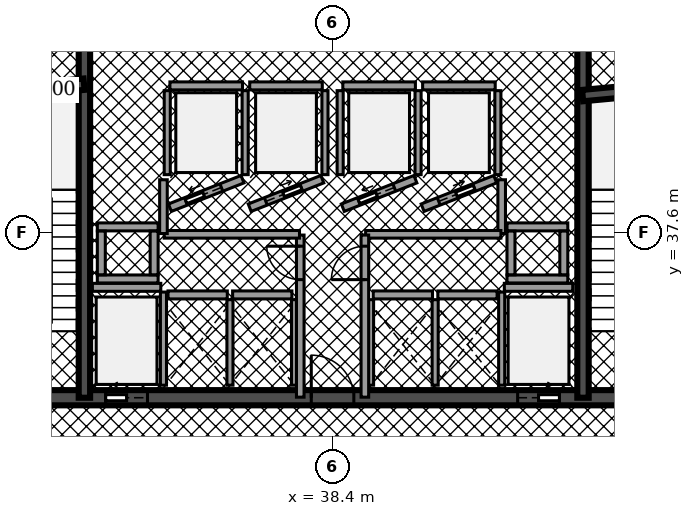
"""IFC4 building model, lengths in metres.
Left out: names, types, materials, properties, quantities, classifications, styles, units other than length and angle.
Written with IfcOpenShell. Run it as: python <this file> out.ifc"""

import sys

from ifc_helpers import new_model, si_unit, direction, frame, frame_2d, origin, place, context, subcontext, project, spatial, rectangle, extrude, element, fill, save


model = new_model("IFC4")
c1 = context("Model", 3, precision=1e-05, world=origin(), true_north=direction((0.0, 1.0)))
c2 = subcontext(c1, "Body", "Model", "MODEL_VIEW")
j1 = project(units=[si_unit("LENGTHUNIT", "METRE"), si_unit("PLANEANGLEUNIT", "RADIAN")], contexts=[c1])
p1 = place(None, origin())
s1 = spatial("IfcSite", under=j1, at=p1, CompositionType="ELEMENT")
p2 = place(p1, origin())
s2 = spatial("IfcBuilding", under=s1, at=p2, CompositionType="ELEMENT")
p3 = place(p2, frame((0.0, 0.0, 22.78)))
s3 = spatial("IfcBuildingStorey", under=s2, at=p3, CompositionType="ELEMENT", Elevation=22.78)
p4 = place(p3, frame((28.4, 33.25, 0.0), z_axis=(0.0, 0.0, 1.0), x_axis=(1.0, 0.0, 0.0)))
e1 = element("IfcWall", 1, at=p4, inside=s3, PredefinedType="SHEAR", context=c2, shape_type="SweptSolid", body=[
    extrude(rectangle(XDim=20.06, YDim=0.4, at=frame_2d((10.03, 0.0))), origin(), (0.0, 0.0, 1.0), 4.5),
])
p5 = place(p4, frame((4.03, 0.0, 0.0)))
e2 = element("IfcOpeningElement", 2, at=p5, cuts=e1, PredefinedType="OPENING", context=c2, shape_type="SweptSolid", body=[
    extrude(rectangle(XDim=1.1, YDim=2.15, at=frame_2d((0.55, 1.075))), frame((0.0, 0.21, 0.0), z_axis=(0.0, -1.0, 0.0), x_axis=(1.0, 0.0, 0.0)), (0.0, 0.0, 1.0), 0.42),
])
p6 = place(p4, frame((14.87, 0.0, 0.0)))
e3 = element("IfcOpeningElement", 3, at=p6, cuts=e1, PredefinedType="OPENING", context=c2, shape_type="SweptSolid", body=[
    extrude(rectangle(XDim=1.1, YDim=2.15, at=frame_2d((0.55, 1.075))), frame((0.0, 0.21, 0.0), z_axis=(0.0, -1.0, 0.0), x_axis=(1.0, 0.0, 0.0)), (0.0, 0.0, 1.0), 0.42),
])
p7 = place(p4, frame((1.31, 0.0, 0.0)))
e4 = element("IfcOpeningElement", 4, at=p7, cuts=e1, PredefinedType="OPENING", context=c2, shape_type="SweptSolid", body=[
    extrude(rectangle(XDim=1.1, YDim=2.2, at=frame_2d((0.55, 1.1))), frame((0.0, 0.21, 0.0), z_axis=(0.0, -1.0, 0.0), x_axis=(1.0, 0.0, 0.0)), (0.0, 0.0, 1.0), 0.42),
])
p8 = place(p4, frame((9.44, 0.0, 0.0)))
e5 = element("IfcOpeningElement", 5, at=p8, cuts=e1, PredefinedType="OPENING", context=c2, shape_type="SweptSolid", body=[
    extrude(rectangle(XDim=1.12, YDim=2.05, at=frame_2d((0.56, 1.025))), frame((0.0, 0.21, 0.0), z_axis=(0.0, -1.0, 0.0), x_axis=(1.0, 0.0, 0.0)), (0.0, 0.0, 1.0), 0.42),
])
p9 = place(p4, frame((17.65, 0.0, 0.0)))
e6 = element("IfcOpeningElement", 6, at=p9, cuts=e1, PredefinedType="OPENING", context=c2, shape_type="SweptSolid", body=[
    extrude(rectangle(XDim=1.1, YDim=2.2, at=frame_2d((0.55, 1.1))), frame((0.0, 0.21, 0.0), z_axis=(0.0, -1.0, 0.0), x_axis=(1.0, 0.0, 0.0)), (0.0, 0.0, 1.0), 0.42),
])
for number, where, z_axis, x_axis in (
    (7, (31.87, 33.25, 0.0), (0.0, 0.0, 1.0), (0.0, 1.0, 0.0)),
    (8, (44.99, 33.25, 0.0), (0.0, 0.0, 1.0), (0.0, 1.0, 0.0)),
):
    element("IfcWall", number, at=place(p3, frame(where, z_axis=z_axis, x_axis=x_axis)), inside=s3, PredefinedType="SHEAR", context=c2, shape_type="SweptSolid", body=[
        extrude(rectangle(XDim=10.2, YDim=0.3, at=frame_2d((5.1, 0.0))), origin(), (0.0, 0.0, 1.0), 4.5),
    ])
p10 = place(p3, frame((28.64, 41.2, 0.0), z_axis=(0.0, 0.0, 1.0), x_axis=(0.995687118776, 0.092774789157, 0.0)))
e9 = element("IfcWall", 9, at=p10, inside=s3, PredefinedType="SHEAR", context=c2, shape_type="SweptSolid", body=[
    extrude(rectangle(XDim=3.234, YDim=0.3, at=frame_2d((1.617, 0.0))), origin(), (0.0, 0.0, 1.0), 4.5),
])
p11 = place(p3, frame((44.98, 41.2, 0.0), z_axis=(0.0, 0.0, 1.0), x_axis=(0.995686468965, 0.09278176286, 0.0)))
e10 = element("IfcWall", 10, at=p11, inside=s3, PredefinedType="SHEAR", context=c2, shape_type="SweptSolid", body=[
    extrude(rectangle(XDim=3.234, YDim=0.3, at=frame_2d((1.617, 0.0))), origin(), (0.0, 0.0, 1.0), 4.5),
])
p12 = place(p3, frame((32.08, 36.155, 0.0), z_axis=(0.0, 0.0, 1.0), x_axis=(1.0, 0.0, 0.0)))
e11 = element("IfcWall", 11, at=p12, inside=s3, PredefinedType="SOLIDWALL", context=c2, shape_type="SweptSolid", body=[
    extrude(rectangle(XDim=1.8, YDim=0.21, at=frame_2d((0.9, 0.0))), origin(), (0.0, 0.0, 1.0), 3.472),
])
p13 = place(p3, frame((33.95, 33.58, 0.0), z_axis=(0.0, 0.0, 1.0), x_axis=(0.0, 1.0, 0.0)))
e12 = element("IfcWall", 12, at=p13, inside=s3, PredefinedType="SOLIDWALL", context=c2, shape_type="SweptSolid", body=[
    extrude(rectangle(XDim=2.45, YDim=0.16, at=frame_2d((1.225, 0.0))), origin(), (0.0, 0.0, 1.0), 3.472),
])
p14 = place(p3, frame((42.92, 36.155, 0.0), z_axis=(0.0, 0.0, 1.0), x_axis=(1.0, 0.0, 0.0)))
e13 = element("IfcWall", 13, at=p14, inside=s3, PredefinedType="SOLIDWALL", context=c2, shape_type="SweptSolid", body=[
    extrude(rectangle(XDim=1.8, YDim=0.21, at=frame_2d((0.9, 0.0))), origin(), (0.0, 0.0, 1.0), 3.472),
])
p15 = place(p3, frame((42.85, 33.58, 0.0), z_axis=(0.0, 0.0, 1.0), x_axis=(0.0, 1.0, 0.0)))
e14 = element("IfcWall", 14, at=p15, inside=s3, PredefinedType="SOLIDWALL", context=c2, shape_type="SweptSolid", body=[
    extrude(rectangle(XDim=2.45, YDim=0.16, at=frame_2d((1.225, 0.0))), origin(), (0.0, 0.0, 1.0), 3.472),
])
p16 = place(p3, frame((34.12, 38.25, 0.0), z_axis=(0.0, 0.0, 1.0), x_axis=(0.930804993012, 0.36551616241, 0.0)))
e15 = element("IfcWall", 15, at=p16, inside=s3, PredefinedType="SOLIDWALL", context=c2, shape_type="SweptSolid", body=[
    extrude(rectangle(XDim=2.052, YDim=0.21, at=frame_2d((1.026, 0.0))), origin(), (0.0, 0.0, 1.0), 3.472),
])
p17 = place(p16, frame((0.455, 0.0, 0.0)))
e16 = element("IfcOpeningElement", 16, at=p17, cuts=e15, PredefinedType="OPENING", context=c2, shape_type="SweptSolid", body=[
    extrude(rectangle(XDim=1.0, YDim=2.1, at=frame_2d((0.5, 1.05))), frame((0.0, 0.115, 0.0), z_axis=(0.0, -1.0, 0.0), x_axis=(1.0, 0.0, 0.0)), (0.0, 0.0, 1.0), 0.23),
])
p18 = place(p3, frame((34.12, 41.455, 0.0), z_axis=(0.0, 0.0, 1.0), x_axis=(1.0, 0.0, 0.0)))
e17 = element("IfcWall", 17, at=p18, inside=s3, PredefinedType="SOLIDWALL", context=c2, shape_type="SweptSolid", body=[
    extrude(rectangle(XDim=1.91, YDim=0.21, at=frame_2d((0.955, 0.0))), origin(), (0.0, 0.0, 1.0), 3.472),
])
for number, where, z_axis, x_axis in (
    (18, (34.05, 39.12, 0.0), (0.0, 0.0, 1.0), (0.0, 1.0, 0.0)),
    (19, (36.1, 39.12, 0.0), (0.0, 0.0, 1.0), (0.0, 1.0, 0.0)),
):
    element("IfcWall", number, at=place(p3, frame(where, z_axis=z_axis, x_axis=x_axis)), inside=s3, PredefinedType="SOLIDWALL", context=c2, shape_type="SweptSolid", body=[
        extrude(rectangle(XDim=2.21, YDim=0.16, at=frame_2d((1.105, 0.0))), origin(), (0.0, 0.0, 1.0), 3.472),
    ])
p19 = place(p3, frame((36.22, 38.25, 0.0), z_axis=(0.0, 0.0, 1.0), x_axis=(0.930804993012, 0.36551616241, 0.0)))
e20 = element("IfcWall", 20, at=p19, inside=s3, PredefinedType="SOLIDWALL", context=c2, shape_type="SweptSolid", body=[
    extrude(rectangle(XDim=2.052, YDim=0.21, at=frame_2d((1.026, 0.0))), origin(), (0.0, 0.0, 1.0), 3.472),
])
p20 = place(p19, frame((0.455, 0.0, 0.0)))
e21 = element("IfcOpeningElement", 21, at=p20, cuts=e20, PredefinedType="OPENING", context=c2, shape_type="SweptSolid", body=[
    extrude(rectangle(XDim=1.0, YDim=2.1, at=frame_2d((0.5, 1.05))), frame((0.0, 0.115, 0.0), z_axis=(0.0, -1.0, 0.0), x_axis=(1.0, 0.0, 0.0)), (0.0, 0.0, 1.0), 0.23),
])
p21 = place(p3, frame((36.22, 41.455, 0.0), z_axis=(0.0, 0.0, 1.0), x_axis=(1.0, 0.0, 0.0)))
e22 = element("IfcWall", 22, at=p21, inside=s3, PredefinedType="SOLIDWALL", context=c2, shape_type="SweptSolid", body=[
    extrude(rectangle(XDim=1.91, YDim=0.21, at=frame_2d((0.955, 0.0))), origin(), (0.0, 0.0, 1.0), 3.472),
])
p22 = place(p3, frame((38.2, 39.12, 0.0), z_axis=(0.0, 0.0, 1.0), x_axis=(0.0, 1.0, 0.0)))
e23 = element("IfcWall", 23, at=p22, inside=s3, PredefinedType="SOLIDWALL", context=c2, shape_type="SweptSolid", body=[
    extrude(rectangle(XDim=2.21, YDim=0.16, at=frame_2d((1.105, 0.0))), origin(), (0.0, 0.0, 1.0), 3.472),
])
p23 = place(p3, frame((38.67, 38.25, 0.0), z_axis=(0.0, 0.0, 1.0), x_axis=(0.930820886763, 0.3654756856, 0.0)))
e24 = element("IfcWall", 24, at=p23, inside=s3, PredefinedType="SOLIDWALL", context=c2, shape_type="SweptSolid", body=[
    extrude(rectangle(XDim=2.052, YDim=0.21, at=frame_2d((1.026, 0.0))), origin(), (0.0, 0.0, 1.0), 3.472),
])
p24 = place(p23, frame((0.455, 0.0, 0.0)))
e25 = element("IfcOpeningElement", 25, at=p24, cuts=e24, PredefinedType="OPENING", context=c2, shape_type="SweptSolid", body=[
    extrude(rectangle(XDim=1.0, YDim=2.1, at=frame_2d((0.5, 1.05))), frame((0.0, 0.115, 0.0), z_axis=(0.0, -1.0, 0.0), x_axis=(1.0, 0.0, 0.0)), (0.0, 0.0, 1.0), 0.23),
])
p25 = place(p3, frame((38.67, 41.455, 0.0), z_axis=(0.0, 0.0, 1.0), x_axis=(1.0, 0.0, 0.0)))
e26 = element("IfcWall", 26, at=p25, inside=s3, PredefinedType="SOLIDWALL", context=c2, shape_type="SweptSolid", body=[
    extrude(rectangle(XDim=1.91, YDim=0.21, at=frame_2d((0.955, 0.0))), origin(), (0.0, 0.0, 1.0), 3.472),
])
for number, where, z_axis, x_axis in (
    (27, (38.6, 39.12, 0.0), (0.0, 0.0, 1.0), (0.0, 1.0, 0.0)),
    (28, (40.65, 39.12, 0.0), (0.0, 0.0, 1.0), (0.0, 1.0, 0.0)),
):
    element("IfcWall", number, at=place(p3, frame(where, z_axis=z_axis, x_axis=x_axis)), inside=s3, PredefinedType="SOLIDWALL", context=c2, shape_type="SweptSolid", body=[
        extrude(rectangle(XDim=2.21, YDim=0.16, at=frame_2d((1.105, 0.0))), origin(), (0.0, 0.0, 1.0), 3.472),
    ])
p26 = place(p3, frame((40.77, 38.25, 0.0), z_axis=(0.0, 0.0, 1.0), x_axis=(0.930804993012, 0.36551616241, 0.0)))
e29 = element("IfcWall", 29, at=p26, inside=s3, PredefinedType="SOLIDWALL", context=c2, shape_type="SweptSolid", body=[
    extrude(rectangle(XDim=2.052, YDim=0.21, at=frame_2d((1.026, 0.0))), origin(), (0.0, 0.0, 1.0), 3.472),
])
p27 = place(p26, frame((0.455, 0.0, 0.0)))
e30 = element("IfcOpeningElement", 30, at=p27, cuts=e29, PredefinedType="OPENING", context=c2, shape_type="SweptSolid", body=[
    extrude(rectangle(XDim=1.0, YDim=2.1, at=frame_2d((0.5, 1.05))), frame((0.0, 0.115, 0.0), z_axis=(0.0, -1.0, 0.0), x_axis=(1.0, 0.0, 0.0)), (0.0, 0.0, 1.0), 0.23),
])
p28 = place(p3, frame((40.77, 41.455, 0.0), z_axis=(0.0, 0.0, 1.0), x_axis=(1.0, 0.0, 0.0)))
e31 = element("IfcWall", 31, at=p28, inside=s3, PredefinedType="SOLIDWALL", context=c2, shape_type="SweptSolid", body=[
    extrude(rectangle(XDim=1.91, YDim=0.21, at=frame_2d((0.955, 0.0))), origin(), (0.0, 0.0, 1.0), 3.472),
])
p29 = place(p3, frame((42.75, 39.12, 0.0), z_axis=(0.0, 0.0, 1.0), x_axis=(0.0, 1.0, 0.0)))
e32 = element("IfcWall", 32, at=p29, inside=s3, PredefinedType="SOLIDWALL", context=c2, shape_type="SweptSolid", body=[
    extrude(rectangle(XDim=2.21, YDim=0.16, at=frame_2d((1.105, 0.0))), origin(), (0.0, 0.0, 1.0), 3.472),
])
p30 = place(p3, frame((34.07, 35.955, 0.0), z_axis=(0.0, 0.0, 1.0), x_axis=(1.0, 0.0, 0.0)))
e33 = element("IfcWall", 33, at=p30, inside=s3, PredefinedType="SOLIDWALL", context=c2, shape_type="SweptSolid", body=[
    extrude(rectangle(XDim=1.56, YDim=0.21, at=frame_2d((0.78, 0.0))), origin(), (0.0, 0.0, 1.0), 3.472),
])
p31 = place(p3, frame((35.7, 33.58, 0.0), z_axis=(0.0, 0.0, 1.0), x_axis=(0.0, 1.0, 0.0)))
e34 = element("IfcWall", 34, at=p31, inside=s3, PredefinedType="SOLIDWALL", context=c2, shape_type="SweptSolid", body=[
    extrude(rectangle(XDim=2.25, YDim=0.16, at=frame_2d((1.125, 0.0))), origin(), (0.0, 0.0, 1.0), 3.472),
])
p32 = place(p3, frame((35.77, 35.955, 0.0), z_axis=(0.0, 0.0, 1.0), x_axis=(1.0, 0.0, 0.0)))
e35 = element("IfcWall", 35, at=p32, inside=s3, PredefinedType="SOLIDWALL", context=c2, shape_type="SweptSolid", body=[
    extrude(rectangle(XDim=1.56, YDim=0.21, at=frame_2d((0.78, 0.0))), origin(), (0.0, 0.0, 1.0), 3.472),
])
p33 = place(p3, frame((37.4, 33.58, 0.0), z_axis=(0.0, 0.0, 1.0), x_axis=(0.0, 1.0, 0.0)))
e36 = element("IfcWall", 36, at=p33, inside=s3, PredefinedType="SOLIDWALL", context=c2, shape_type="SweptSolid", body=[
    extrude(rectangle(XDim=2.25, YDim=0.16, at=frame_2d((1.125, 0.0))), origin(), (0.0, 0.0, 1.0), 3.472),
])
p34 = place(p3, frame((39.47, 35.955, 0.0), z_axis=(0.0, 0.0, 1.0), x_axis=(1.0, 0.0, 0.0)))
e37 = element("IfcWall", 37, at=p34, inside=s3, PredefinedType="SOLIDWALL", context=c2, shape_type="SweptSolid", body=[
    extrude(rectangle(XDim=1.56, YDim=0.21, at=frame_2d((0.78, 0.0))), origin(), (0.0, 0.0, 1.0), 3.472),
])
for number, where, z_axis, x_axis in (
    (38, (39.4, 33.58, 0.0), (0.0, 0.0, 1.0), (0.0, 1.0, 0.0)),
    (39, (41.1, 33.58, 0.0), (0.0, 0.0, 1.0), (0.0, 1.0, 0.0)),
):
    element("IfcWall", number, at=place(p3, frame(where, z_axis=z_axis, x_axis=x_axis)), inside=s3, PredefinedType="SOLIDWALL", context=c2, shape_type="SweptSolid", body=[
        extrude(rectangle(XDim=2.25, YDim=0.16, at=frame_2d((1.125, 0.0))), origin(), (0.0, 0.0, 1.0), 3.472),
    ])
p35 = place(p3, frame((41.17, 35.955, 0.0), z_axis=(0.0, 0.0, 1.0), x_axis=(1.0, 0.0, 0.0)))
e40 = element("IfcWall", 40, at=p35, inside=s3, PredefinedType="SOLIDWALL", context=c2, shape_type="SweptSolid", body=[
    extrude(rectangle(XDim=1.56, YDim=0.21, at=frame_2d((0.78, 0.0))), origin(), (0.0, 0.0, 1.0), 3.472),
])
for number, where, z_axis, x_axis in (
    (41, (32.21, 36.375, 0.0), (0.0, 0.0, 1.0), (1.0, 0.0, 0.0)),
    (42, (32.21, 37.745, 0.0), (0.0, 0.0, 1.0), (1.0, 0.0, 0.0)),
):
    element("IfcWall", number, at=place(p3, frame(where, z_axis=z_axis, x_axis=x_axis)), inside=s3, PredefinedType="SOLIDWALL", context=c2, shape_type="SweptSolid", body=[
        extrude(rectangle(XDim=1.6, YDim=0.21, at=frame_2d((0.8, 0.0))), origin(), (0.0, 0.0, 1.0), 4.5),
    ])
for number, where, z_axis, x_axis in (
    (43, (32.315, 36.485, 0.0), (0.0, 0.0, 1.0), (0.0, 1.0, 0.0)),
    (44, (33.705, 36.485, 0.0), (0.0, 0.0, 1.0), (0.0, 1.0, 0.0)),
):
    element("IfcWall", number, at=place(p3, frame(where, z_axis=z_axis, x_axis=x_axis)), inside=s3, PredefinedType="SOLIDWALL", context=c2, shape_type="SweptSolid", body=[
        extrude(rectangle(XDim=1.15, YDim=0.21, at=frame_2d((0.575, 0.0))), origin(), (0.0, 0.0, 1.0), 4.5),
    ])
for number, where, z_axis, x_axis in (
    (45, (42.99, 36.375, 0.0), (0.0, 0.0, 1.0), (1.0, 0.0, 0.0)),
    (46, (42.99, 37.745, 0.0), (0.0, 0.0, 1.0), (1.0, 0.0, 0.0)),
):
    element("IfcWall", number, at=place(p3, frame(where, z_axis=z_axis, x_axis=x_axis)), inside=s3, PredefinedType="SOLIDWALL", context=c2, shape_type="SweptSolid", body=[
        extrude(rectangle(XDim=1.6, YDim=0.21, at=frame_2d((0.8, 0.0))), origin(), (0.0, 0.0, 1.0), 4.5),
    ])
for number, where, z_axis, x_axis in (
    (47, (43.095, 36.485, 0.0), (0.0, 0.0, 1.0), (0.0, 1.0, 0.0)),
    (48, (44.485, 36.485, 0.0), (0.0, 0.0, 1.0), (0.0, 1.0, 0.0)),
):
    element("IfcWall", number, at=place(p3, frame(where, z_axis=z_axis, x_axis=x_axis)), inside=s3, PredefinedType="SOLIDWALL", context=c2, shape_type="SweptSolid", body=[
        extrude(rectangle(XDim=1.15, YDim=0.21, at=frame_2d((0.575, 0.0))), origin(), (0.0, 0.0, 1.0), 4.5),
    ])
p36 = place(p3, frame((37.55, 33.265, 0.0), z_axis=(0.0, 0.0, 1.0), x_axis=(0.0, 1.0, 0.0)))
e49 = element("IfcWall", 49, at=p36, inside=s3, PredefinedType="PARTITIONING", context=c2, shape_type="SweptSolid", body=[
    extrude(rectangle(XDim=4.265, YDim=0.2, at=frame_2d((2.133, 0.0))), origin(), (0.0, 0.0, 1.0), 3.457),
])
p37 = place(p36, frame((3.093, 0.0, 0.0)))
e50 = element("IfcOpeningElement", 50, at=p37, cuts=e49, PredefinedType="OPENING", context=c2, shape_type="SweptSolid", body=[
    extrude(rectangle(XDim=0.88, YDim=2.05, at=frame_2d((0.44, 1.025))), frame((0.0, 0.11, 0.0), z_axis=(0.0, -1.0, 0.0), x_axis=(1.0, 0.0, 0.0)), (0.0, 0.0, 1.0), 0.22),
])
p38 = place(p3, frame((33.97, 37.55, 0.0), z_axis=(0.0, 0.0, 1.0), x_axis=(1.0, 0.0, 0.0)))
e51 = element("IfcWall", 51, at=p38, inside=s3, PredefinedType="PARTITIONING", context=c2, shape_type="SweptSolid", body=[
    extrude(rectangle(XDim=3.56, YDim=0.2, at=frame_2d((1.78, 0.0))), origin(), (0.0, 0.0, 1.0), 3.457),
])
for number, where, z_axis, x_axis in (
    (52, (33.95, 37.57, 0.0), (0.0, 0.0, 1.0), (0.0, 1.0, 0.0)),
    (53, (42.85, 37.57, 0.0), (0.0, 0.0, 1.0), (0.0, 1.0, 0.0)),
):
    element("IfcWall", number, at=place(p3, frame(where, z_axis=z_axis, x_axis=x_axis)), inside=s3, PredefinedType="PARTITIONING", context=c2, shape_type="SweptSolid", body=[
        extrude(rectangle(XDim=1.415, YDim=0.2, at=frame_2d((0.708, 0.0))), origin(), (0.0, 0.0, 1.0), 3.457),
    ])
p39 = place(p3, frame((39.27, 37.55, 0.0), z_axis=(0.0, 0.0, 1.0), x_axis=(1.0, 0.0, 0.0)))
e54 = element("IfcWall", 54, at=p39, inside=s3, PredefinedType="PARTITIONING", context=c2, shape_type="SweptSolid", body=[
    extrude(rectangle(XDim=3.56, YDim=0.2, at=frame_2d((1.78, 0.0))), origin(), (0.0, 0.0, 1.0), 3.457),
])
p40 = place(p3, frame((39.25, 33.265, 0.0), z_axis=(0.0, 0.0, 1.0), x_axis=(0.0, 1.0, 0.0)))
e55 = element("IfcWall", 55, at=p40, inside=s3, PredefinedType="PARTITIONING", context=c2, shape_type="SweptSolid", body=[
    extrude(rectangle(XDim=4.265, YDim=0.2, at=frame_2d((2.133, 0.0))), origin(), (0.0, 0.0, 1.0), 3.457),
])
p41 = place(p40, frame((3.093, 0.0, 0.0)))
e56 = element("IfcOpeningElement", 56, at=p41, cuts=e55, PredefinedType="OPENING", context=c2, shape_type="SweptSolid", body=[
    extrude(rectangle(XDim=0.88, YDim=2.05, at=frame_2d((0.44, 1.025))), frame((0.0, 0.11, 0.0), z_axis=(0.0, -1.0, 0.0), x_axis=(1.0, 0.0, 0.0)), (0.0, 0.0, 1.0), 0.22),
])
p42 = place(p5, origin())
e57 = element("IfcDoor", 57, at=p42, inside=s3, OperationType="SLIDING_TO_LEFT", PredefinedType="DOOR", context=c2, shape_type="SweptSolid", body=[
    extrude(rectangle(XDim=1.1, YDim=2.15, at=frame_2d((0.55, 1.075))), frame((0.0, 0.025, 0.0), z_axis=(0.0, -1.0, 0.0), x_axis=(1.0, 0.0, 0.0)), (0.0, 0.0, 1.0), 0.05),
])
fill(e2, e57)
p43 = place(p6, origin())
e58 = element("IfcDoor", 58, at=p43, inside=s3, OperationType="SLIDING_TO_RIGHT", PredefinedType="DOOR", context=c2, shape_type="SweptSolid", body=[
    extrude(rectangle(XDim=1.1, YDim=2.15, at=frame_2d((0.55, 1.075))), frame((0.0, 0.025, 0.0), z_axis=(0.0, -1.0, 0.0), x_axis=(1.0, 0.0, 0.0)), (0.0, 0.0, 1.0), 0.05),
])
fill(e3, e58)
p44 = place(p17, origin())
e59 = element("IfcDoor", 59, at=p44, inside=s3, OperationType="SLIDING_TO_LEFT", PredefinedType="DOOR", context=c2, shape_type="SweptSolid", body=[
    extrude(rectangle(XDim=1.0, YDim=2.1, at=frame_2d((0.5, 1.05))), frame((0.0, 0.025, 0.0), z_axis=(0.0, -1.0, 0.0), x_axis=(1.0, 0.0, 0.0)), (0.0, 0.0, 1.0), 0.05),
])
fill(e16, e59)
p45 = place(p20, origin())
e60 = element("IfcDoor", 60, at=p45, inside=s3, OperationType="SLIDING_TO_RIGHT", PredefinedType="DOOR", context=c2, shape_type="SweptSolid", body=[
    extrude(rectangle(XDim=1.0, YDim=2.1, at=frame_2d((0.5, 1.05))), frame((0.0, 0.025, 0.0), z_axis=(0.0, -1.0, 0.0), x_axis=(1.0, 0.0, 0.0)), (0.0, 0.0, 1.0), 0.05),
])
fill(e21, e60)
p46 = place(p24, origin())
e61 = element("IfcDoor", 61, at=p46, inside=s3, OperationType="SLIDING_TO_LEFT", PredefinedType="DOOR", context=c2, shape_type="SweptSolid", body=[
    extrude(rectangle(XDim=1.0, YDim=2.1, at=frame_2d((0.5, 1.05))), frame((0.0, 0.025, 0.0), z_axis=(0.0, -1.0, 0.0), x_axis=(1.0, 0.0, 0.0)), (0.0, 0.0, 1.0), 0.05),
])
fill(e25, e61)
p47 = place(p27, origin())
e62 = element("IfcDoor", 62, at=p47, inside=s3, OperationType="SLIDING_TO_RIGHT", PredefinedType="DOOR", context=c2, shape_type="SweptSolid", body=[
    extrude(rectangle(XDim=1.0, YDim=2.1, at=frame_2d((0.5, 1.05))), frame((0.0, 0.025, 0.0), z_axis=(0.0, -1.0, 0.0), x_axis=(1.0, 0.0, 0.0)), (0.0, 0.0, 1.0), 0.05),
])
fill(e30, e62)
p48 = place(p8, origin())
e63 = element("IfcDoor", 63, at=p48, inside=s3, OperationType="SINGLE_SWING_LEFT", PredefinedType="DOOR", context=c2, shape_type="SweptSolid", body=[
    extrude(rectangle(XDim=1.12, YDim=2.05, at=frame_2d((0.56, 1.025))), frame((0.0, 0.025, 0.0), z_axis=(0.0, -1.0, 0.0), x_axis=(1.0, 0.0, 0.0)), (0.0, 0.0, 1.0), 0.05),
])
fill(e5, e63)
p49 = place(p37, origin())
e64 = element("IfcDoor", 64, at=p49, inside=s3, OperationType="SINGLE_SWING_RIGHT", PredefinedType="DOOR", context=c2, shape_type="SweptSolid", body=[
    extrude(rectangle(XDim=0.88, YDim=2.05, at=frame_2d((0.44, 1.025))), frame((0.0, 0.025, 0.0), z_axis=(0.0, -1.0, 0.0), x_axis=(1.0, 0.0, 0.0)), (0.0, 0.0, 1.0), 0.05),
])
fill(e50, e64)
p50 = place(p41, origin())
e65 = element("IfcDoor", 65, at=p50, inside=s3, OperationType="SINGLE_SWING_LEFT", PredefinedType="DOOR", context=c2, shape_type="SweptSolid", body=[
    extrude(rectangle(XDim=0.88, YDim=2.05, at=frame_2d((0.44, 1.025))), frame((0.0, 0.025, 0.0), z_axis=(0.0, -1.0, 0.0), x_axis=(1.0, 0.0, 0.0)), (0.0, 0.0, 1.0), 0.05),
])
fill(e56, e65)
save(model, sys.argv[1])
